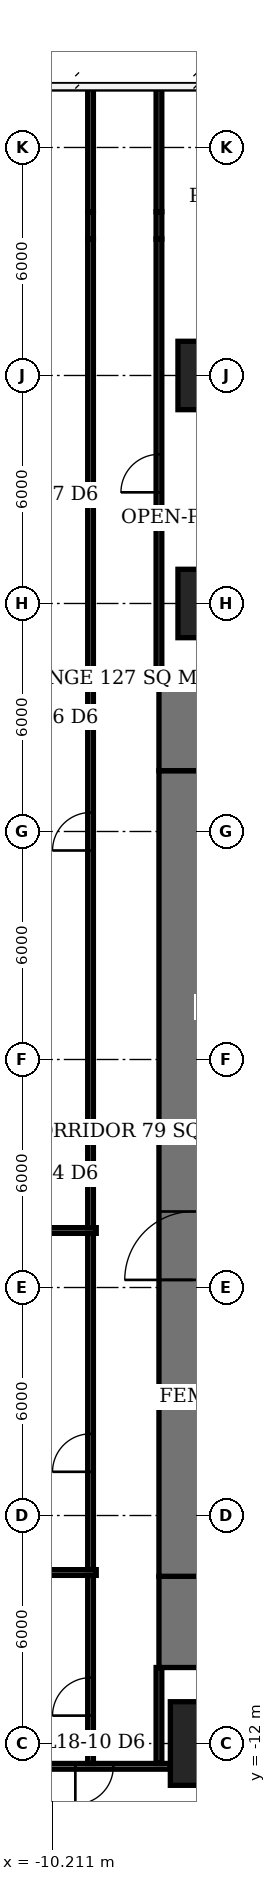
"""IFC4 building model, lengths in metres.
Left out: names, types, materials, properties, quantities, classifications, styles, units other than length and angle.
Written with IfcOpenShell. Run it as: python <this file> out.ifc"""

import sys

from ifc_helpers import new_model, si_unit, direction, frame, frame_2d, origin, origin_2d, place, context, subcontext, project, spatial, rectangle, extrude, element, fill, save


model = new_model("IFC4")
c1 = context("Model", 3, precision=1e-05, world=origin(), true_north=direction((0.0, 1.0)))
c2 = subcontext(c1, "Body", "Model", "MODEL_VIEW")
j1 = project(units=[si_unit("LENGTHUNIT", "METRE"), si_unit("PLANEANGLEUNIT", "RADIAN")], contexts=[c1])
p1 = place(None, origin())
s1 = spatial("IfcSite", under=j1, at=p1, CompositionType="ELEMENT")
p2 = place(p1, origin())
s2 = spatial("IfcBuilding", under=s1, at=p2, CompositionType="ELEMENT")
p3 = place(p2, frame((0.0, 0.0, 76.7)))
s3 = spatial("IfcBuildingStorey", under=s2, at=p3, CompositionType="ELEMENT", Elevation=76.7)
p4 = place(p3, frame((-6.0, -12.0, 0.0), z_axis=(0.0, 0.0, 1.0), x_axis=(1.0, 0.0, 0.0)))
e1 = element("IfcColumn", 1, at=p4, inside=s3, PredefinedType="COLUMN", context=c2, shape_type="SweptSolid", body=[
    extrude(rectangle(XDim=2.2, YDim=2.2, at=origin_2d()), origin(), (0.0, 0.0, 1.0), 3.9),
])
for number, where, z_axis, x_axis in (
    (2, (-6.0, 18.0, 0.0), (0.0, 0.0, 1.0), (1.0, 0.0, 0.0)),
    (3, (-6.0, 24.0, 0.0), (0.0, 0.0, 1.0), (1.0, 0.0, 0.0)),
):
    element("IfcColumn", number, at=place(p3, frame(where, z_axis=z_axis, x_axis=x_axis)), inside=s3, PredefinedType="COLUMN", context=c2, shape_type="SweptSolid", body=[
        extrude(rectangle(XDim=1.8, YDim=1.8, at=origin_2d()), origin(), (0.0, 0.0, 1.0), 3.9),
    ])
p5 = place(p3, frame((-6.5, -7.6, 0.0), z_axis=(0.0, 0.0, 1.0), x_axis=(0.0, 1.0, 0.0)))
e4 = element("IfcWall", 4, at=p5, inside=s3, PredefinedType="SHEAR", context=c2, shape_type="SweptSolid", body=[
    extrude(rectangle(XDim=21.2, YDim=1.8, at=frame_2d((10.6, 0.0))), origin(), (0.0, 0.0, 1.0), 3.9),
])
p6 = place(p5, frame((7.8, 0.0, 0.0)))
e5 = element("IfcOpeningElement", 5, at=p6, cuts=e4, PredefinedType="OPENING", context=c2, shape_type="SweptSolid", body=[
    extrude(rectangle(XDim=1.8, YDim=2.4, at=frame_2d((0.9, 1.2))), frame((0.0, 0.91, 0.0), z_axis=(0.0, -1.0, 0.0), x_axis=(1.0, 0.0, 0.0)), (0.0, 0.0, 1.0), 1.82),
])
for number, where, z_axis, x_axis in (
    (6, (-6.5, -10.0, 0.0), (0.0, 0.0, 1.0), (0.0, 1.0, 0.0)),
    (7, (-6.5, 13.6, 0.0), (0.0, 0.0, 1.0), (0.0, 1.0, 0.0)),
):
    element("IfcWall", number, at=place(p3, frame(where, z_axis=z_axis, x_axis=x_axis)), inside=s3, PredefinedType="SHEAR", context=c2, shape_type="SweptSolid", body=[
        extrude(rectangle(XDim=2.4, YDim=1.8, at=frame_2d((1.2, 0.0))), origin(), (0.0, 0.0, 1.0), 3.9),
    ])
p7 = place(p3, frame((-7.1, -12.6, 0.0), z_axis=(0.0, 0.0, 1.0), x_axis=(-1.0, 0.0, 0.0)))
e8 = element("IfcWall", 8, at=p7, inside=s3, PredefinedType="PARTITIONING", context=c2, shape_type="SweptSolid", body=[
    extrude(rectangle(XDim=4.0, YDim=0.15, at=frame_2d((2.0, 0.0))), origin(), (0.0, 0.0, 1.0), 3.65),
])
p8 = place(p7, frame((1.5, 0.0, 0.0)))
e9 = element("IfcOpeningElement", 9, at=p8, cuts=e8, PredefinedType="OPENING", context=c2, shape_type="SweptSolid", body=[
    extrude(rectangle(XDim=1.0, YDim=2.1, at=frame_2d((0.5, 1.05))), frame((0.0, 0.085, 0.0), z_axis=(0.0, -1.0, 0.0), x_axis=(1.0, 0.0, 0.0)), (0.0, 0.0, 1.0), 0.17),
])
p9 = place(p3, frame((-19.6, -7.5, 0.0), z_axis=(0.0, 0.0, 1.0), x_axis=(1.0, 0.0, 0.0)))
e10 = element("IfcWall", 10, at=p9, inside=s3, PredefinedType="PARTITIONING", context=c2, shape_type="SweptSolid", body=[
    extrude(rectangle(XDim=10.55, YDim=0.15, at=frame_2d((5.275, 0.0))), origin(), (0.0, 0.0, 1.0), 3.65),
])
p10 = place(p3, frame((-11.925, 1.5, 0.0), z_axis=(0.0, 0.0, 1.0), x_axis=(1.0, 0.0, 0.0)))
e11 = element("IfcWall", 11, at=p10, inside=s3, PredefinedType="PARTITIONING", context=c2, shape_type="SweptSolid", body=[
    extrude(rectangle(XDim=2.875, YDim=0.15, at=frame_2d((1.438, 0.0))), origin(), (0.0, 0.0, 1.0), 3.65),
])
p11 = place(p3, frame((-9.2, -12.525, 0.0), z_axis=(0.0, 0.0, 1.0), x_axis=(0.0, 1.0, 0.0)))
e12 = element("IfcWall", 12, at=p11, inside=s3, PredefinedType="PARTITIONING", context=c2, shape_type="SweptSolid", body=[
    extrude(rectangle(XDim=4.95, YDim=0.15, at=frame_2d((2.475, 0.0))), origin(), (0.0, 0.0, 1.0), 3.65),
])
p12 = place(p11, frame((1.259, 0.0, 0.0)))
e13 = element("IfcOpeningElement", 13, at=p12, cuts=e12, PredefinedType="OPENING", context=c2, shape_type="SweptSolid", body=[
    extrude(rectangle(XDim=1.0, YDim=2.1, at=frame_2d((0.5, 1.05))), frame((0.0, 0.085, 0.0), z_axis=(0.0, -1.0, 0.0), x_axis=(1.0, 0.0, 0.0)), (0.0, 0.0, 1.0), 0.17),
])
p13 = place(p3, frame((-9.2, -7.425, 0.0), z_axis=(0.0, 0.0, 1.0), x_axis=(0.0, 1.0, 0.0)))
e14 = element("IfcWall", 14, at=p13, inside=s3, PredefinedType="PARTITIONING", context=c2, shape_type="SweptSolid", body=[
    extrude(rectangle(XDim=8.85, YDim=0.15, at=frame_2d((4.425, 0.0))), origin(), (0.0, 0.0, 1.0), 3.65),
])
p14 = place(p13, frame((2.575, 0.0, 0.0)))
e15 = element("IfcOpeningElement", 15, at=p14, cuts=e14, PredefinedType="OPENING", context=c2, shape_type="SweptSolid", body=[
    extrude(rectangle(XDim=1.0, YDim=2.1, at=frame_2d((0.5, 1.05))), frame((0.0, 0.085, 0.0), z_axis=(0.0, -1.0, 0.0), x_axis=(1.0, 0.0, 0.0)), (0.0, 0.0, 1.0), 0.17),
])
p15 = place(p3, frame((-9.2, 1.575, 0.0), z_axis=(0.0, 0.0, 1.0), x_axis=(0.0, 1.0, 0.0)))
e16 = element("IfcWall", 16, at=p15, inside=s3, PredefinedType="PARTITIONING", context=c2, shape_type="SweptSolid", body=[
    extrude(rectangle(XDim=26.015, YDim=0.15, at=frame_2d((13.008, 0.0))), origin(), (0.0, 0.0, 1.0), 3.65),
])
p16 = place(p15, frame((9.925, 0.0, 0.0)))
e17 = element("IfcOpeningElement", 17, at=p16, cuts=e16, PredefinedType="OPENING", context=c2, shape_type="SweptSolid", body=[
    extrude(rectangle(XDim=1.0, YDim=2.1, at=frame_2d((0.5, 1.05))), frame((0.0, 0.085, 0.0), z_axis=(0.0, -1.0, 0.0), x_axis=(1.0, 0.0, 0.0)), (0.0, 0.0, 1.0), 0.17),
])
p17 = place(p3, frame((-9.2, 27.59, 0.0), z_axis=(0.0, 0.0, 1.0), x_axis=(0.0, 1.0, 0.0)))
e18 = element("IfcWall", 18, at=p17, inside=s3, PredefinedType="PARTITIONING", context=c2, shape_type="SweptSolid", body=[
    extrude(rectangle(XDim=0.72, YDim=0.15, at=frame_2d((0.36, 0.0))), origin(), (0.0, 0.0, 1.0), 2.65),
])
p18 = place(p3, frame((-9.2, 28.31, 0.0), z_axis=(0.0, 0.0, 1.0), x_axis=(0.0, 1.0, 0.0)))
e19 = element("IfcWall", 19, at=p18, inside=s3, PredefinedType="PARTITIONING", context=c2, shape_type="SweptSolid", body=[
    extrude(rectangle(XDim=3.29, YDim=0.15, at=frame_2d((1.645, 0.0))), origin(), (0.0, 0.0, 1.0), 3.65),
])
p19 = place(p3, frame((-7.4, -12.525, 0.0), z_axis=(0.0, 0.0, 1.0), x_axis=(0.0, 1.0, 0.0)))
e20 = element("IfcWall", 20, at=p19, inside=s3, PredefinedType="PARTITIONING", context=c2, shape_type="SweptSolid", body=[
    extrude(rectangle(XDim=2.525, YDim=0.15, at=frame_2d((1.262, 0.0))), origin(), (0.0, 0.0, 1.0), 3.65),
])
p20 = place(p3, frame((-7.4, 16.0, 0.0), z_axis=(0.0, 0.0, 1.0), x_axis=(0.0, 1.0, 0.0)))
e21 = element("IfcWall", 21, at=p20, inside=s3, PredefinedType="PARTITIONING", context=c2, shape_type="SweptSolid", body=[
    extrude(rectangle(XDim=11.59, YDim=0.15, at=frame_2d((5.795, 0.0))), origin(), (0.0, 0.0, 1.0), 3.65),
])
p21 = place(p20, frame((4.925, 0.0, 0.0)))
e22 = element("IfcOpeningElement", 22, at=p21, cuts=e21, PredefinedType="OPENING", context=c2, shape_type="SweptSolid", body=[
    extrude(rectangle(XDim=1.0, YDim=2.1, at=frame_2d((0.5, 1.05))), frame((0.0, 0.085, 0.0), z_axis=(0.0, -1.0, 0.0), x_axis=(1.0, 0.0, 0.0)), (0.0, 0.0, 1.0), 0.17),
])
p22 = place(p3, frame((-7.4, 27.59, 0.0), z_axis=(0.0, 0.0, 1.0), x_axis=(0.0, 1.0, 0.0)))
e23 = element("IfcWall", 23, at=p22, inside=s3, PredefinedType="PARTITIONING", context=c2, shape_type="SweptSolid", body=[
    extrude(rectangle(XDim=0.72, YDim=0.15, at=frame_2d((0.36, 0.0))), origin(), (0.0, 0.0, 1.0), 2.65),
])
p23 = place(p3, frame((-7.4, 28.31, 0.0), z_axis=(0.0, 0.0, 1.0), x_axis=(0.0, 1.0, 0.0)))
e24 = element("IfcWall", 24, at=p23, inside=s3, PredefinedType="PARTITIONING", context=c2, shape_type="SweptSolid", body=[
    extrude(rectangle(XDim=3.29, YDim=0.15, at=frame_2d((1.645, 0.0))), origin(), (0.0, 0.0, 1.0), 3.65),
])
p24 = place(p6, origin())
e25 = element("IfcDoor", 25, at=p24, inside=s3, OperationType="DOUBLE_DOOR_SINGLE_SWING", PredefinedType="DOOR", context=c2, shape_type="SweptSolid", body=[
    extrude(rectangle(XDim=1.8, YDim=2.4, at=frame_2d((0.9, 1.2))), frame((0.0, 0.025, 0.0), z_axis=(0.0, -1.0, 0.0), x_axis=(1.0, 0.0, 0.0)), (0.0, 0.0, 1.0), 0.05),
])
fill(e5, e25)
p25 = place(p8, origin())
e26 = element("IfcDoor", 26, at=p25, inside=s3, OperationType="SINGLE_SWING_RIGHT", PredefinedType="DOOR", context=c2, shape_type="SweptSolid", body=[
    extrude(rectangle(XDim=1.0, YDim=2.1, at=frame_2d((0.5, 1.05))), frame((0.0, 0.025, 0.0), z_axis=(0.0, -1.0, 0.0), x_axis=(1.0, 0.0, 0.0)), (0.0, 0.0, 1.0), 0.05),
])
fill(e9, e26)
p26 = place(p12, origin())
e27 = element("IfcDoor", 27, at=p26, inside=s3, OperationType="SINGLE_SWING_LEFT", PredefinedType="DOOR", context=c2, shape_type="SweptSolid", body=[
    extrude(rectangle(XDim=1.0, YDim=2.1, at=frame_2d((0.5, 1.05))), frame((0.0, 0.025, 0.0), z_axis=(0.0, -1.0, 0.0), x_axis=(1.0, 0.0, 0.0)), (0.0, 0.0, 1.0), 0.05),
])
fill(e13, e27)
p27 = place(p14, origin())
e28 = element("IfcDoor", 28, at=p27, inside=s3, OperationType="SINGLE_SWING_LEFT", PredefinedType="DOOR", context=c2, shape_type="SweptSolid", body=[
    extrude(rectangle(XDim=1.0, YDim=2.1, at=frame_2d((0.5, 1.05))), frame((0.0, 0.025, 0.0), z_axis=(0.0, -1.0, 0.0), x_axis=(1.0, 0.0, 0.0)), (0.0, 0.0, 1.0), 0.05),
])
fill(e15, e28)
p28 = place(p16, origin())
e29 = element("IfcDoor", 29, at=p28, inside=s3, OperationType="SINGLE_SWING_LEFT", PredefinedType="DOOR", context=c2, shape_type="SweptSolid", body=[
    extrude(rectangle(XDim=1.0, YDim=2.1, at=frame_2d((0.5, 1.05))), frame((0.0, 0.025, 0.0), z_axis=(0.0, -1.0, 0.0), x_axis=(1.0, 0.0, 0.0)), (0.0, 0.0, 1.0), 0.05),
])
fill(e17, e29)
p29 = place(p21, origin())
e30 = element("IfcDoor", 30, at=p29, inside=s3, OperationType="SINGLE_SWING_LEFT", PredefinedType="DOOR", context=c2, shape_type="SweptSolid", body=[
    extrude(rectangle(XDim=1.0, YDim=2.1, at=frame_2d((0.5, 1.05))), frame((0.0, 0.025, 0.0), z_axis=(0.0, -1.0, 0.0), x_axis=(1.0, 0.0, 0.0)), (0.0, 0.0, 1.0), 0.05),
])
fill(e22, e30)
save(model, sys.argv[1])
